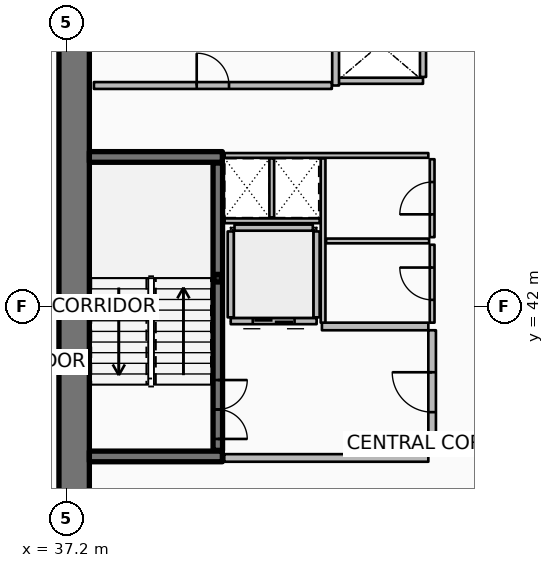
"""IFC4 building model, lengths in metres.
Left out: names, types, materials, properties, quantities, classifications, styles, units other than length and angle.
Written with IfcOpenShell. Run it as: python <this file> out.ifc"""

import sys

from ifc_helpers import new_model, si_unit, direction, frame, frame_2d, origin, origin_2d, place, context, subcontext, project, spatial, rectangle, hollow_rectangle, extrude, element, fill, save


model = new_model("IFC4")
c1 = context("Model", 3, precision=1e-05, world=origin(), true_north=direction((0.0, 1.0)))
c2 = subcontext(c1, "Body", "Model", "MODEL_VIEW")
j1 = project(units=[si_unit("LENGTHUNIT", "METRE"), si_unit("PLANEANGLEUNIT", "RADIAN")], contexts=[c1])
p1 = place(None, origin())
s1 = spatial("IfcSite", under=j1, at=p1, CompositionType="ELEMENT")
p2 = place(p1, origin())
s2 = spatial("IfcBuilding", under=s1, at=p2, CompositionType="ELEMENT")
p3 = place(p2, frame((0.0, 0.0, 93.9)))
s3 = spatial("IfcBuildingStorey", under=s2, at=p3, CompositionType="ELEMENT", Elevation=93.9)
p4 = place(p3, frame((37.4, 34.0, 0.0), z_axis=(0.0, 0.0, 1.0), x_axis=(0.0, 1.0, 0.0)))
e1 = element("IfcWall", 1, at=p4, inside=s3, PredefinedType="SHEAR", context=c2, shape_type="SweptSolid", body=[
    extrude(rectangle(XDim=16.0, YDim=0.8, at=frame_2d((8.0, 0.0))), origin(), (0.0, 0.0, 1.0), 3.75),
])
for number, where, z_axis, x_axis in (
    (2, (37.8, 38.06, 0.0), (0.0, 0.0, 1.0), (1.0, 0.0, 0.0)),
    (3, (37.8, 45.94, 0.0), (0.0, 0.0, 1.0), (1.0, 0.0, 0.0)),
):
    element("IfcWall", number, at=place(p3, frame(where, z_axis=z_axis, x_axis=x_axis)), inside=s3, PredefinedType="SHEAR", context=c2, shape_type="SweptSolid", body=[
        extrude(rectangle(XDim=3.5, YDim=0.28, at=frame_2d((1.75, 0.0))), origin(), (0.0, 0.0, 1.0), 3.75),
    ])
p5 = place(p3, frame((41.18, 42.75, 0.0), z_axis=(0.0, 0.0, 1.0), x_axis=(1.0, 0.0, 0.0)))
e4 = element("IfcColumn", 4, at=p5, inside=s3, PredefinedType="COLUMN", context=c2, shape_type="SweptSolid", body=[
    extrude(hollow_rectangle(XDim=0.2, YDim=0.2, WallThickness=0.01, InnerFilletRadius=0.01, OuterFilletRadius=0.02, at=origin_2d()), origin(), (0.0, 0.0, 1.0), 1.67),
])
p6 = place(p3, frame((41.18, 38.22, 0.0), z_axis=(0.0, 0.0, 1.0), x_axis=(0.0, 1.0, 0.0)))
e5 = element("IfcWall", 5, at=p6, inside=s3, PredefinedType="SOLIDWALL", context=c2, shape_type="SweptSolid", body=[
    extrude(rectangle(XDim=7.56, YDim=0.25, at=frame_2d((3.78, 0.0))), origin(), (0.0, 0.0, 1.0), 3.5),
])
p7 = place(p6, frame((0.3, 0.0, 0.0)))
e6 = element("IfcOpeningElement", 6, at=p7, cuts=e5, PredefinedType="OPENING", context=c2, shape_type="SweptSolid", body=[
    extrude(rectangle(XDim=1.55, YDim=2.15, at=frame_2d((0.775, 1.075))), frame((0.0, 0.135, 0.0), z_axis=(0.0, -1.0, 0.0), x_axis=(1.0, 0.0, 0.0)), (0.0, 0.0, 1.0), 0.27),
])
p8 = place(p3, frame((46.58, 47.945, 0.0), z_axis=(0.0, 0.0, 1.0), x_axis=(-1.0, 0.0, 0.0)))
e7 = element("IfcWall", 7, at=p8, inside=s3, PredefinedType="PARTITIONING", context=c2, shape_type="SweptSolid", body=[
    extrude(rectangle(XDim=2.26, YDim=0.16, at=frame_2d((1.13, 0.0))), origin(), (0.0, 0.0, 1.0), 3.5),
])
p9 = place(p3, frame((46.58, 48.045, 0.0), z_axis=(0.0, 0.0, 1.0), x_axis=(0.0, 1.0, 0.0)))
e8 = element("IfcWall", 8, at=p9, inside=s3, PredefinedType="PARTITIONING", context=c2, shape_type="SweptSolid", body=[
    extrude(rectangle(XDim=1.71, YDim=0.16, at=frame_2d((0.855, 0.0))), origin(), (0.0, 0.0, 1.0), 3.5),
])
p10 = place(p3, frame((43.78, 41.62, 0.0), z_axis=(0.0, 0.0, 1.0), x_axis=(-1.0, 0.0, 0.0)))
e9 = element("IfcWall", 9, at=p10, inside=s3, PredefinedType="PARTITIONING", context=c2, shape_type="SweptSolid", body=[
    extrude(rectangle(XDim=2.26, YDim=0.16, at=frame_2d((1.13, 0.0))), origin(), (0.0, 0.0, 1.0), 3.5),
])
p11 = place(p10, frame((0.58, 0.0, 0.0)))
e10 = element("IfcOpeningElement", 10, at=p11, cuts=e9, PredefinedType="OPENING", context=c2, shape_type="SweptSolid", body=[
    extrude(rectangle(XDim=1.1, YDim=2.1, at=frame_2d((0.55, 1.05))), frame((0.0, 0.09, 0.0), z_axis=(0.0, -1.0, 0.0), x_axis=(1.0, 0.0, 0.0)), (0.0, 0.0, 1.0), 0.18),
])
for number, where, z_axis, x_axis in (
    (11, (43.78, 41.72, 0.0), (0.0, 0.0, 1.0), (0.0, 1.0, 0.0)),
    (12, (41.52, 41.72, 0.0), (0.0, 0.0, 1.0), (0.0, 1.0, 0.0)),
):
    element("IfcWall", number, at=place(p3, frame(where, z_axis=z_axis, x_axis=x_axis)), inside=s3, PredefinedType="PARTITIONING", context=c2, shape_type="SweptSolid", body=[
        extrude(rectangle(XDim=2.26, YDim=0.16, at=frame_2d((1.13, 0.0))), origin(), (0.0, 0.0, 1.0), 3.5),
    ])
p12 = place(p3, frame((41.62, 44.08, 0.0), z_axis=(0.0, 0.0, 1.0), x_axis=(1.0, 0.0, 0.0)))
e13 = element("IfcWall", 13, at=p12, inside=s3, PredefinedType="PARTITIONING", context=c2, shape_type="SweptSolid", body=[
    extrude(rectangle(XDim=2.06, YDim=0.16, at=frame_2d((1.03, 0.0))), origin(), (0.0, 0.0, 1.0), 3.5),
])
p13 = place(p3, frame((37.92, 47.82, 0.0), z_axis=(0.0, 0.0, 1.0), x_axis=(1.0, 0.0, 0.0)))
e14 = element("IfcWall", 14, at=p13, inside=s3, PredefinedType="PARTITIONING", context=c2, shape_type="SweptSolid", body=[
    extrude(rectangle(XDim=6.26, YDim=0.18, at=frame_2d((3.13, 0.0))), origin(), (0.0, 0.0, 1.0), 3.5),
])
p14 = place(p13, frame((2.705, 0.0, 0.0)))
e15 = element("IfcOpeningElement", 15, at=p14, cuts=e14, PredefinedType="OPENING", context=c2, shape_type="SweptSolid", body=[
    extrude(rectangle(XDim=0.85, YDim=2.06, at=frame_2d((0.425, 1.03))), frame((0.0, 0.1, 0.0), z_axis=(0.0, -1.0, 0.0), x_axis=(1.0, 0.0, 0.0)), (0.0, 0.0, 1.0), 0.2),
])
p15 = place(p3, frame((44.28, 47.82, 0.0), z_axis=(0.0, 0.0, 1.0), x_axis=(0.0, 1.0, 0.0)))
e16 = element("IfcWall", 16, at=p15, inside=s3, PredefinedType="PARTITIONING", context=c2, shape_type="SweptSolid", body=[
    extrude(rectangle(XDim=2.13, YDim=0.18, at=frame_2d((1.065, 0.0))), origin(), (0.0, 0.0, 1.0), 3.5),
])
p16 = place(p3, frame((41.35, 38.02, 0.0), z_axis=(0.0, 0.0, 1.0), x_axis=(1.0, 0.0, 0.0)))
e17 = element("IfcWall", 17, at=p16, inside=s3, PredefinedType="PARTITIONING", context=c2, shape_type="SweptSolid", body=[
    extrude(rectangle(XDim=5.37, YDim=0.2, at=frame_2d((2.685, 0.0))), origin(), (0.0, 0.0, 1.0), 3.5),
])
p17 = place(p3, frame((43.92, 41.48, 0.0), z_axis=(0.0, 0.0, 1.0), x_axis=(1.0, 0.0, 0.0)))
e18 = element("IfcWall", 18, at=p17, inside=s3, PredefinedType="PARTITIONING", context=c2, shape_type="SweptSolid", body=[
    extrude(rectangle(XDim=2.8, YDim=0.2, at=frame_2d((1.4, 0.0))), origin(), (0.0, 0.0, 1.0), 3.5),
])
p18 = place(p3, frame((46.82, 38.12, 0.0), z_axis=(0.0, 0.0, 1.0), x_axis=(0.0, 1.0, 0.0)))
e19 = element("IfcWall", 19, at=p18, inside=s3, PredefinedType="PARTITIONING", context=c2, shape_type="SweptSolid", body=[
    extrude(rectangle(XDim=3.26, YDim=0.2, at=frame_2d((1.63, 0.0))), origin(), (0.0, 0.0, 1.0), 3.5),
])
p19 = place(p18, frame((1.105, 0.0, 0.0)))
e20 = element("IfcOpeningElement", 20, at=p19, cuts=e19, PredefinedType="OPENING", context=c2, shape_type="SweptSolid", body=[
    extrude(rectangle(XDim=1.05, YDim=2.1, at=frame_2d((0.525, 1.05))), frame((0.0, 0.11, 0.0), z_axis=(0.0, -1.0, 0.0), x_axis=(1.0, 0.0, 0.0)), (0.0, 0.0, 1.0), 0.22),
])
p20 = place(p3, frame((41.36, 45.98, 0.0), z_axis=(0.0, 0.0, 1.0), x_axis=(1.0, 0.0, 0.0)))
e21 = element("IfcWall", 21, at=p20, inside=s3, PredefinedType="PARTITIONING", context=c2, shape_type="SweptSolid", body=[
    extrude(rectangle(XDim=5.36, YDim=0.125, at=frame_2d((2.68, 0.0))), origin(), (0.0, 0.0, 1.0), 2.94),
])
p21 = place(p3, frame((41.36, 44.26, 0.0), z_axis=(0.0, 0.0, 1.0), x_axis=(1.0, 0.0, 0.0)))
e22 = element("IfcWall", 22, at=p21, inside=s3, PredefinedType="PARTITIONING", context=c2, shape_type="SweptSolid", body=[
    extrude(rectangle(XDim=2.5, YDim=0.125, at=frame_2d((1.25, 0.0))), origin(), (0.0, 0.0, 1.0), 2.94),
])
p22 = place(p3, frame((42.6, 44.35, 0.0), z_axis=(0.0, 0.0, 1.0), x_axis=(0.0, 1.0, 0.0)))
e23 = element("IfcWall", 23, at=p22, inside=s3, PredefinedType="PARTITIONING", context=c2, shape_type="SweptSolid", body=[
    extrude(rectangle(XDim=1.55, YDim=0.125, at=frame_2d((0.775, 0.0))), origin(), (0.0, 0.0, 1.0), 2.94),
])
p23 = place(p3, frame((43.95, 41.58, 0.0), z_axis=(0.0, 0.0, 1.0), x_axis=(0.0, 1.0, 0.0)))
e24 = element("IfcWall", 24, at=p23, inside=s3, PredefinedType="PARTITIONING", context=c2, shape_type="SweptSolid", body=[
    extrude(rectangle(XDim=4.32, YDim=0.125, at=frame_2d((2.16, 0.0))), origin(), (0.0, 0.0, 1.0), 2.94),
])
p24 = place(p3, frame((44.03, 43.73, 0.0), z_axis=(0.0, 0.0, 1.0), x_axis=(1.0, 0.0, 0.0)))
e25 = element("IfcWall", 25, at=p24, inside=s3, PredefinedType="PARTITIONING", context=c2, shape_type="SweptSolid", body=[
    extrude(rectangle(XDim=2.71, YDim=0.125, at=frame_2d((1.355, 0.0))), origin(), (0.0, 0.0, 1.0), 2.94),
])
p25 = place(p3, frame((46.82, 41.58, 0.0), z_axis=(0.0, 0.0, 1.0), x_axis=(0.0, 1.0, 0.0)))
e26 = element("IfcWall", 26, at=p25, inside=s3, PredefinedType="PARTITIONING", context=c2, shape_type="SweptSolid", body=[
    extrude(rectangle(XDim=2.05, YDim=0.125, at=frame_2d((1.025, 0.0))), origin(), (0.0, 0.0, 1.0), 2.94),
])
p26 = place(p25, frame((0.6, 0.0, 0.0)))
e27 = element("IfcOpeningElement", 27, at=p26, cuts=e26, PredefinedType="OPENING", context=c2, shape_type="SweptSolid", body=[
    extrude(rectangle(XDim=0.85, YDim=2.06, at=frame_2d((0.425, 1.03))), frame((0.0, 0.073, 0.0), z_axis=(0.0, -1.0, 0.0), x_axis=(1.0, 0.0, 0.0)), (0.0, 0.0, 1.0), 0.145),
])
p27 = place(p3, frame((46.82, 43.83, 0.0), z_axis=(0.0, 0.0, 1.0), x_axis=(0.0, 1.0, 0.0)))
e28 = element("IfcWall", 28, at=p27, inside=s3, PredefinedType="PARTITIONING", context=c2, shape_type="SweptSolid", body=[
    extrude(rectangle(XDim=2.05, YDim=0.125, at=frame_2d((1.025, 0.0))), origin(), (0.0, 0.0, 1.0), 2.94),
])
p28 = place(p27, frame((0.6, 0.0, 0.0)))
e29 = element("IfcOpeningElement", 29, at=p28, cuts=e28, PredefinedType="OPENING", context=c2, shape_type="SweptSolid", body=[
    extrude(rectangle(XDim=0.85, YDim=2.06, at=frame_2d((0.425, 1.03))), frame((0.0, 0.073, 0.0), z_axis=(0.0, -1.0, 0.0), x_axis=(1.0, 0.0, 0.0)), (0.0, 0.0, 1.0), 0.145),
])
p29 = place(p7, origin())
e30 = element("IfcDoor", 30, at=p29, inside=s3, OperationType="DOUBLE_DOOR_SINGLE_SWING", PredefinedType="DOOR", context=c2, shape_type="SweptSolid", body=[
    extrude(rectangle(XDim=1.55, YDim=2.15, at=frame_2d((0.775, 1.075))), frame((0.0, 0.025, 0.0), z_axis=(0.0, -1.0, 0.0), x_axis=(1.0, 0.0, 0.0)), (0.0, 0.0, 1.0), 0.05),
])
fill(e6, e30)
p30 = place(p11, origin())
e31 = element("IfcDoor", 31, at=p30, inside=s3, OperationType="DOUBLE_DOOR_SLIDING", PredefinedType="DOOR", context=c2, shape_type="SweptSolid", body=[
    extrude(rectangle(XDim=1.1, YDim=2.1, at=frame_2d((0.55, 1.05))), frame((0.0, 0.025, 0.0), z_axis=(0.0, -1.0, 0.0), x_axis=(1.0, 0.0, 0.0)), (0.0, 0.0, 1.0), 0.05),
])
fill(e10, e31)
p31 = place(p14, origin())
e32 = element("IfcDoor", 32, at=p31, inside=s3, OperationType="SINGLE_SWING_LEFT", PredefinedType="DOOR", context=c2, shape_type="SweptSolid", body=[
    extrude(rectangle(XDim=0.85, YDim=2.06, at=frame_2d((0.425, 1.03))), frame((0.0, 0.025, 0.0), z_axis=(0.0, -1.0, 0.0), x_axis=(1.0, 0.0, 0.0)), (0.0, 0.0, 1.0), 0.05),
])
fill(e15, e32)
p32 = place(p19, origin())
e33 = element("IfcDoor", 33, at=p32, inside=s3, OperationType="SINGLE_SWING_RIGHT", PredefinedType="DOOR", context=c2, shape_type="SweptSolid", body=[
    extrude(rectangle(XDim=1.05, YDim=2.1, at=frame_2d((0.525, 1.05))), frame((0.0, 0.025, 0.0), z_axis=(0.0, -1.0, 0.0), x_axis=(1.0, 0.0, 0.0)), (0.0, 0.0, 1.0), 0.05),
])
fill(e20, e33)
p33 = place(p26, origin())
e34 = element("IfcDoor", 34, at=p33, inside=s3, OperationType="SINGLE_SWING_RIGHT", PredefinedType="DOOR", context=c2, shape_type="SweptSolid", body=[
    extrude(rectangle(XDim=0.85, YDim=2.06, at=frame_2d((0.425, 1.03))), frame((0.0, 0.025, 0.0), z_axis=(0.0, -1.0, 0.0), x_axis=(1.0, 0.0, 0.0)), (0.0, 0.0, 1.0), 0.05),
])
fill(e27, e34)
p34 = place(p28, origin())
e35 = element("IfcDoor", 35, at=p34, inside=s3, OperationType="SINGLE_SWING_LEFT", PredefinedType="DOOR", context=c2, shape_type="SweptSolid", body=[
    extrude(rectangle(XDim=0.85, YDim=2.06, at=frame_2d((0.425, 1.03))), frame((0.0, 0.025, 0.0), z_axis=(0.0, -1.0, 0.0), x_axis=(1.0, 0.0, 0.0)), (0.0, 0.0, 1.0), 0.05),
])
fill(e29, e35)
save(model, sys.argv[1])
